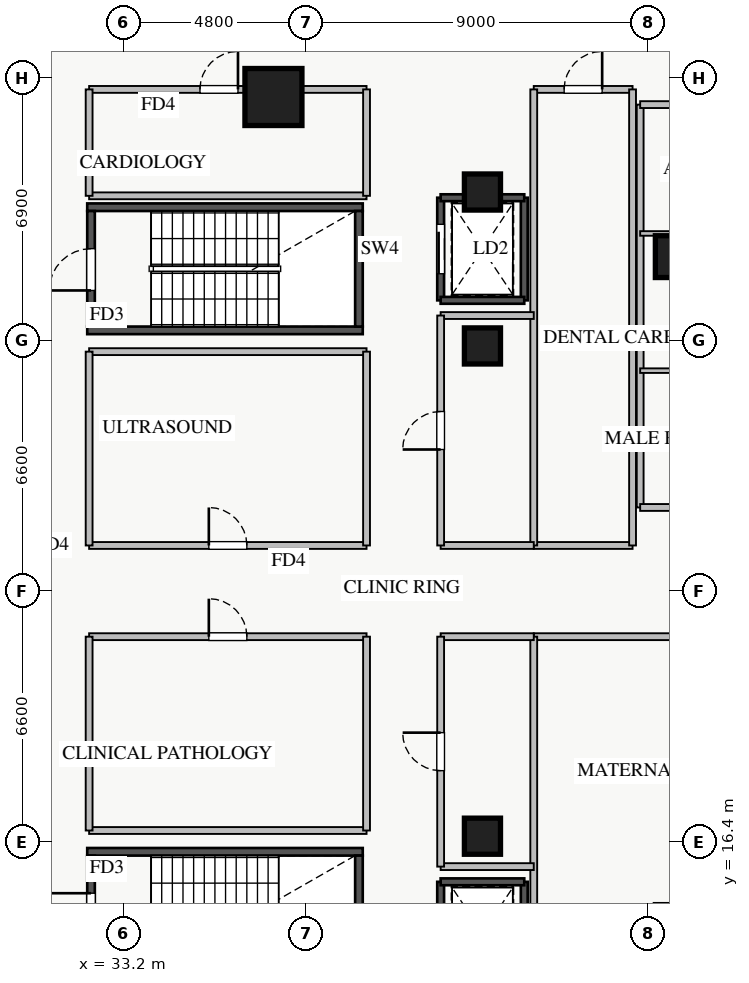
"""IFC4 building model, lengths in metres.
Left out: names, types, materials, properties, quantities, classifications, styles, units other than length and angle.
Written with IfcOpenShell. Run it as: python <this file> out.ifc"""

import sys

from ifc_helpers import new_model, si_unit, direction, frame, frame_2d, origin, origin_2d, place, context, subcontext, project, spatial, rectangle, extrude, source, transform, mapped, element, fill, save


model = new_model("IFC4")
c1 = context("Model", 3, precision=1e-05, world=origin(), true_north=direction((0.0, 1.0)))
c2 = subcontext(c1, "Body", "Model", "MODEL_VIEW")
j1 = project(units=[si_unit("LENGTHUNIT", "METRE"), si_unit("PLANEANGLEUNIT", "RADIAN")], contexts=[c1])
p1 = place(None, origin())
s1 = spatial("IfcSite", under=j1, at=p1, CompositionType="ELEMENT")
p2 = place(p1, origin())
s2 = spatial("IfcBuilding", under=s1, at=p2, CompositionType="ELEMENT")
p3 = place(p2, frame((0.0, 0.0, 5.0)))
s3 = spatial("IfcBuildingStorey", under=s2, at=p3, CompositionType="ELEMENT", Elevation=5.0)
p4 = place(p3, frame((41.55, 30.65, 0.0), z_axis=(0.0, 0.0, 1.0), x_axis=(0.0, 1.0, 0.0)))
e1 = element("IfcWall", 1, at=p4, inside=s3, PredefinedType="SHEAR", context=c2, shape_type="SweptSolid", body=[
    extrude(rectangle(XDim=2.7, YDim=0.18, at=frame_2d((1.35, 0.0))), origin(), (0.0, 0.0, 1.0), 4.18),
])
p5 = place(p4, frame((0.7, 0.0, 0.0)))
e2 = element("IfcOpeningElement", 2, at=p5, cuts=e1, PredefinedType="OPENING", context=c2, shape_type="SweptSolid", body=[
    extrude(rectangle(XDim=1.3, YDim=2.05, at=frame_2d((0.65, 1.025))), frame((0.0, 0.1, 0.0), z_axis=(0.0, -1.0, 0.0), x_axis=(1.0, 0.0, 0.0)), (0.0, 0.0, 1.0), 0.2),
])
p6 = place(p3, frame((43.75, 30.65, 0.0), z_axis=(0.0, 0.0, 1.0), x_axis=(0.0, 1.0, 0.0)))
e3 = element("IfcWall", 3, at=p6, inside=s3, PredefinedType="SHEAR", context=c2, shape_type="SweptSolid", body=[
    extrude(rectangle(XDim=2.7, YDim=0.18, at=frame_2d((1.35, 0.0))), origin(), (0.0, 0.0, 1.0), 4.18),
])
for number, where, z_axis, x_axis in (
    (4, (41.55, 30.65, 0.0), (0.0, 0.0, 1.0), (1.0, 0.0, 0.0)),
    (5, (41.55, 33.35, 0.0), (0.0, 0.0, 1.0), (1.0, 0.0, 0.0)),
):
    element("IfcWall", number, at=place(p3, frame(where, z_axis=z_axis, x_axis=x_axis)), inside=s3, PredefinedType="SHEAR", context=c2, shape_type="SweptSolid", body=[
        extrude(rectangle(XDim=2.2, YDim=0.18, at=frame_2d((1.1, 0.0))), origin(), (0.0, 0.0, 1.0), 4.18),
    ])
p7 = place(p3, frame((41.55, 12.65, 0.0), z_axis=(0.0, 0.0, 1.0), x_axis=(0.0, 1.0, 0.0)))
e6 = element("IfcWall", 6, at=p7, inside=s3, PredefinedType="SHEAR", context=c2, shape_type="SweptSolid", body=[
    extrude(rectangle(XDim=2.7, YDim=0.18, at=frame_2d((1.35, 0.0))), origin(), (0.0, 0.0, 1.0), 4.18),
])
p8 = place(p7, frame((0.7, 0.0, 0.0)))
e7 = element("IfcOpeningElement", 7, at=p8, cuts=e6, PredefinedType="OPENING", context=c2, shape_type="SweptSolid", body=[
    extrude(rectangle(XDim=1.3, YDim=2.05, at=frame_2d((0.65, 1.025))), frame((0.0, 0.1, 0.0), z_axis=(0.0, -1.0, 0.0), x_axis=(1.0, 0.0, 0.0)), (0.0, 0.0, 1.0), 0.2),
])
p9 = place(p3, frame((43.75, 12.65, 0.0), z_axis=(0.0, 0.0, 1.0), x_axis=(0.0, 1.0, 0.0)))
e8 = element("IfcWall", 8, at=p9, inside=s3, PredefinedType="SHEAR", context=c2, shape_type="SweptSolid", body=[
    extrude(rectangle(XDim=2.7, YDim=0.18, at=frame_2d((1.35, 0.0))), origin(), (0.0, 0.0, 1.0), 4.18),
])
p10 = place(p3, frame((41.55, 15.35, 0.0), z_axis=(0.0, 0.0, 1.0), x_axis=(1.0, 0.0, 0.0)))
e9 = element("IfcWall", 9, at=p10, inside=s3, PredefinedType="SHEAR", context=c2, shape_type="SweptSolid", body=[
    extrude(rectangle(XDim=2.2, YDim=0.18, at=frame_2d((1.1, 0.0))), origin(), (0.0, 0.0, 1.0), 4.18),
])
for number, where, z_axis, x_axis in (
    (10, (32.25, 29.86, 0.0), (0.0, 0.0, 1.0), (1.0, 0.0, 0.0)),
    (11, (32.25, 33.1, 0.0), (0.0, 0.0, 1.0), (1.0, 0.0, 0.0)),
):
    element("IfcWall", number, at=place(p3, frame(where, z_axis=z_axis, x_axis=x_axis)), inside=s3, PredefinedType="SHEAR", context=c2, shape_type="SweptSolid", body=[
        extrude(rectangle(XDim=7.25, YDim=0.2, at=frame_2d((3.625, 0.0))), origin(), (0.0, 0.0, 1.0), 4.4),
    ])
p11 = place(p3, frame((32.35, 29.96, 0.0), z_axis=(0.0, 0.0, 1.0), x_axis=(0.0, 1.0, 0.0)))
e12 = element("IfcWall", 12, at=p11, inside=s3, PredefinedType="SHEAR", context=c2, shape_type="SweptSolid", body=[
    extrude(rectangle(XDim=3.04, YDim=0.2, at=frame_2d((1.52, 0.0))), origin(), (0.0, 0.0, 1.0), 4.4),
])
p12 = place(p11, frame((0.95, 0.0, 0.0)))
e13 = element("IfcOpeningElement", 13, at=p12, cuts=e12, PredefinedType="OPENING", context=c2, shape_type="SweptSolid", body=[
    extrude(rectangle(XDim=1.1, YDim=2.05, at=frame_2d((0.55, 1.025))), frame((0.0, 0.11, 0.0), z_axis=(0.0, -1.0, 0.0), x_axis=(1.0, 0.0, 0.0)), (0.0, 0.0, 1.0), 0.22),
])
p13 = place(p3, frame((39.4, 29.96, 0.0), z_axis=(0.0, 0.0, 1.0), x_axis=(0.0, 1.0, 0.0)))
e14 = element("IfcWall", 14, at=p13, inside=s3, PredefinedType="SHEAR", context=c2, shape_type="SweptSolid", body=[
    extrude(rectangle(XDim=3.04, YDim=0.2, at=frame_2d((1.52, 0.0))), origin(), (0.0, 0.0, 1.0), 4.4),
])
p14 = place(p3, frame((32.25, 16.14, 0.0), z_axis=(0.0, 0.0, 1.0), x_axis=(1.0, 0.0, 0.0)))
e15 = element("IfcWall", 15, at=p14, inside=s3, PredefinedType="SHEAR", context=c2, shape_type="SweptSolid", body=[
    extrude(rectangle(XDim=7.25, YDim=0.2, at=frame_2d((3.625, 0.0))), origin(), (0.0, 0.0, 1.0), 4.4),
])
p15 = place(p3, frame((32.35, 13.0, 0.0), z_axis=(0.0, 0.0, 1.0), x_axis=(0.0, 1.0, 0.0)))
e16 = element("IfcWall", 16, at=p15, inside=s3, PredefinedType="SHEAR", context=c2, shape_type="SweptSolid", body=[
    extrude(rectangle(XDim=3.04, YDim=0.2, at=frame_2d((1.52, 0.0))), origin(), (0.0, 0.0, 1.0), 4.4),
])
p16 = place(p15, frame((0.95, 0.0, 0.0)))
e17 = element("IfcOpeningElement", 17, at=p16, cuts=e16, PredefinedType="OPENING", context=c2, shape_type="SweptSolid", body=[
    extrude(rectangle(XDim=1.1, YDim=2.05, at=frame_2d((0.55, 1.025))), frame((0.0, 0.11, 0.0), z_axis=(0.0, -1.0, 0.0), x_axis=(1.0, 0.0, 0.0)), (0.0, 0.0, 1.0), 0.22),
])
p17 = place(p3, frame((39.4, 13.0, 0.0), z_axis=(0.0, 0.0, 1.0), x_axis=(0.0, 1.0, 0.0)))
e18 = element("IfcWall", 18, at=p17, inside=s3, PredefinedType="SHEAR", context=c2, shape_type="SweptSolid", body=[
    extrude(rectangle(XDim=3.04, YDim=0.2, at=frame_2d((1.52, 0.0))), origin(), (0.0, 0.0, 1.0), 4.4),
])
m1 = source(origin(), c2, "Body", "SweptSolid", [
    extrude(rectangle(XDim=1.5, YDim=1.5, at=origin_2d()), origin(), (0.0, 0.0, 1.0), 4.4),
])
p18 = place(p3, frame((37.15, 36.0, 0.0), z_axis=(0.0, 0.0, 1.0), x_axis=(1.0, 0.0, 0.0)))
e19 = element("IfcColumn", 19, at=p18, inside=s3, PredefinedType="COLUMN", context=c2, shape_type="MappedRepresentation", body=[
    mapped(m1, transform((0.0, 0.0, 0.0), x_axis=(1.0, 0.0, 0.0), y_axis=(0.0, 1.0, 0.0), z_axis=(0.0, 0.0, 1.0), scale=1.0)),
])
m2 = source(origin(), c2, "Body", "SweptSolid", [
    extrude(rectangle(XDim=1.1, YDim=1.1, at=origin_2d()), origin(), (0.0, 0.0, 1.0), 4.4),
])
p19 = place(p3, frame((47.75, 31.8, 0.0), z_axis=(0.0, 0.0, 1.0), x_axis=(1.0, 0.0, 0.0)))
e20 = element("IfcColumn", 20, at=p19, inside=s3, PredefinedType="COLUMN", context=c2, shape_type="MappedRepresentation", body=[
    mapped(m2, transform((0.0, 0.0, 0.0), x_axis=(1.0, 0.0, 0.0), y_axis=(0.0, 1.0, 0.0), z_axis=(0.0, 0.0, 1.0), scale=1.0)),
])
m3 = source(origin(), c2, "Body", "SweptSolid", [
    extrude(rectangle(XDim=0.95, YDim=0.95, at=origin_2d()), origin(), (0.0, 0.0, 1.0), 4.4),
])
for number, where, z_axis, x_axis in (
    (21, (42.65, 16.55, 0.0), (0.0, 0.0, 1.0), (1.0, 0.0, 0.0)),
    (22, (42.65, 29.45, 0.0), (0.0, 0.0, 1.0), (1.0, 0.0, 0.0)),
    (23, (42.65, 33.5, 0.0), (0.0, 0.0, 1.0), (1.0, 0.0, 0.0)),
):
    element("IfcColumn", number, at=place(p3, frame(where, z_axis=z_axis, x_axis=x_axis)), inside=s3, PredefinedType="COLUMN", context=c2, shape_type="MappedRepresentation", body=[
        mapped(m3, transform((0.0, 0.0, 0.0), x_axis=(1.0, 0.0, 0.0), y_axis=(0.0, 1.0, 0.0), z_axis=(0.0, 0.0, 1.0), scale=1.0)),
    ])
p20 = place(p3, frame((46.8, 25.2, 0.0), z_axis=(0.0, 0.0, 1.0), x_axis=(0.0, 1.0, 0.0)))
e24 = element("IfcWall", 24, at=p20, inside=s3, PredefinedType="PARTITIONING", context=c2, shape_type="SweptSolid", body=[
    extrude(rectangle(XDim=10.6, YDim=0.18, at=frame_2d((5.3, 0.0))), origin(), (0.0, 0.0, 1.0), 4.18),
])
for number, where, z_axis, x_axis in (
    (25, (46.8, 25.2, 0.0), (0.0, 0.0, 1.0), (1.0, 0.0, 0.0)),
    (26, (46.8, 35.8, 0.0), (0.0, 0.0, 1.0), (1.0, 0.0, 0.0)),
):
    element("IfcWall", number, at=place(p3, frame(where, z_axis=z_axis, x_axis=x_axis)), inside=s3, PredefinedType="PARTITIONING", context=c2, shape_type="SweptSolid", body=[
        extrude(rectangle(XDim=5.2, YDim=0.18, at=frame_2d((2.6, 0.0))), origin(), (0.0, 0.0, 1.0), 4.18),
    ])
for number, where, z_axis, x_axis in (
    (27, (46.8, 28.8, 0.0), (0.0, 0.0, 1.0), (1.0, 0.0, 0.0)),
    (28, (46.8, 32.41, 0.0), (0.0, 0.0, 1.0), (1.0, 0.0, 0.0)),
):
    element("IfcWall", number, at=place(p3, frame(where, z_axis=z_axis, x_axis=x_axis)), inside=s3, PredefinedType="PLUMBINGWALL", context=c2, shape_type="SweptSolid", body=[
        extrude(rectangle(XDim=5.2, YDim=0.12, at=frame_2d((2.6, 0.0))), origin(), (0.0, 0.0, 1.0), 4.18),
    ])
p21 = place(p3, frame((32.3, 24.2, 0.0), z_axis=(0.0, 0.0, 1.0), x_axis=(1.0, 0.0, 0.0)))
e29 = element("IfcWall", 29, at=p21, inside=s3, PredefinedType="PARTITIONING", context=c2, shape_type="SweptSolid", body=[
    extrude(rectangle(XDim=7.3, YDim=0.18, at=frame_2d((3.65, 0.0))), origin(), (0.0, 0.0, 1.0), 4.18),
])
p22 = place(p21, frame((3.15, 0.0, 0.0)))
e30 = element("IfcOpeningElement", 30, at=p22, cuts=e29, PredefinedType="OPENING", context=c2, shape_type="SweptSolid", body=[
    extrude(rectangle(XDim=1.0, YDim=2.05, at=frame_2d((0.5, 1.025))), frame((0.0, 0.1, 0.0), z_axis=(0.0, -1.0, 0.0), x_axis=(1.0, 0.0, 0.0)), (0.0, 0.0, 1.0), 0.2),
])
p23 = place(p3, frame((32.3, 29.3, 0.0), z_axis=(0.0, 0.0, 1.0), x_axis=(1.0, 0.0, 0.0)))
e31 = element("IfcWall", 31, at=p23, inside=s3, PredefinedType="PARTITIONING", context=c2, shape_type="SweptSolid", body=[
    extrude(rectangle(XDim=7.3, YDim=0.18, at=frame_2d((3.65, 0.0))), origin(), (0.0, 0.0, 1.0), 3.475),
])
for number, where, z_axis, x_axis in (
    (32, (32.3, 24.2, 0.0), (0.0, 0.0, 1.0), (0.0, 1.0, 0.0)),
    (33, (39.6, 24.2, 0.0), (0.0, 0.0, 1.0), (0.0, 1.0, 0.0)),
):
    element("IfcWall", number, at=place(p3, frame(where, z_axis=z_axis, x_axis=x_axis)), inside=s3, PredefinedType="PARTITIONING", context=c2, shape_type="SweptSolid", body=[
        extrude(rectangle(XDim=5.1, YDim=0.18, at=frame_2d((2.55, 0.0))), origin(), (0.0, 0.0, 1.0), 4.18),
    ])
p24 = place(p3, frame((32.3, 33.4, 0.0), z_axis=(0.0, 0.0, 1.0), x_axis=(1.0, 0.0, 0.0)))
e34 = element("IfcWall", 34, at=p24, inside=s3, PredefinedType="PARTITIONING", context=c2, shape_type="SweptSolid", body=[
    extrude(rectangle(XDim=7.3, YDim=0.18, at=frame_2d((3.65, 0.0))), origin(), (0.0, 0.0, 1.0), 3.325),
])
p25 = place(p3, frame((32.3, 36.2, 0.0), z_axis=(0.0, 0.0, 1.0), x_axis=(1.0, 0.0, 0.0)))
e35 = element("IfcWall", 35, at=p25, inside=s3, PredefinedType="PARTITIONING", context=c2, shape_type="SweptSolid", body=[
    extrude(rectangle(XDim=7.3, YDim=0.18, at=frame_2d((3.65, 0.0))), origin(), (0.0, 0.0, 1.0), 4.18),
])
p26 = place(p25, frame((2.917, 0.0, 0.0)))
e36 = element("IfcOpeningElement", 36, at=p26, cuts=e35, PredefinedType="OPENING", context=c2, shape_type="SweptSolid", body=[
    extrude(rectangle(XDim=1.0, YDim=2.05, at=frame_2d((0.5, 1.025))), frame((0.0, 0.1, 0.0), z_axis=(0.0, -1.0, 0.0), x_axis=(1.0, 0.0, 0.0)), (0.0, 0.0, 1.0), 0.2),
])
for number, where, z_axis, x_axis in (
    (37, (32.3, 33.4, 0.0), (0.0, 0.0, 1.0), (0.0, 1.0, 0.0)),
    (38, (39.6, 33.4, 0.0), (0.0, 0.0, 1.0), (0.0, 1.0, 0.0)),
):
    element("IfcWall", number, at=place(p3, frame(where, z_axis=z_axis, x_axis=x_axis)), inside=s3, PredefinedType="PARTITIONING", context=c2, shape_type="SweptSolid", body=[
        extrude(rectangle(XDim=2.8, YDim=0.18, at=frame_2d((1.4, 0.0))), origin(), (0.0, 0.0, 1.0), 4.18),
    ])
p27 = place(p3, frame((32.3, 16.7, 0.0), z_axis=(0.0, 0.0, 1.0), x_axis=(1.0, 0.0, 0.0)))
e39 = element("IfcWall", 39, at=p27, inside=s3, PredefinedType="PARTITIONING", context=c2, shape_type="SweptSolid", body=[
    extrude(rectangle(XDim=7.3, YDim=0.18, at=frame_2d((3.65, 0.0))), origin(), (0.0, 0.0, 1.0), 3.475),
])
p28 = place(p3, frame((32.3, 21.8, 0.0), z_axis=(0.0, 0.0, 1.0), x_axis=(1.0, 0.0, 0.0)))
e40 = element("IfcWall", 40, at=p28, inside=s3, PredefinedType="PARTITIONING", context=c2, shape_type="SweptSolid", body=[
    extrude(rectangle(XDim=7.3, YDim=0.18, at=frame_2d((3.65, 0.0))), origin(), (0.0, 0.0, 1.0), 4.18),
])
p29 = place(p28, frame((3.15, 0.0, 0.0)))
e41 = element("IfcOpeningElement", 41, at=p29, cuts=e40, PredefinedType="OPENING", context=c2, shape_type="SweptSolid", body=[
    extrude(rectangle(XDim=1.0, YDim=2.05, at=frame_2d((0.5, 1.025))), frame((0.0, 0.1, 0.0), z_axis=(0.0, -1.0, 0.0), x_axis=(1.0, 0.0, 0.0)), (0.0, 0.0, 1.0), 0.2),
])
for number, where, z_axis, x_axis in (
    (42, (32.3, 16.7, 0.0), (0.0, 0.0, 1.0), (0.0, 1.0, 0.0)),
    (43, (39.6, 16.7, 0.0), (0.0, 0.0, 1.0), (0.0, 1.0, 0.0)),
):
    element("IfcWall", number, at=place(p3, frame(where, z_axis=z_axis, x_axis=x_axis)), inside=s3, PredefinedType="PARTITIONING", context=c2, shape_type="SweptSolid", body=[
        extrude(rectangle(XDim=5.1, YDim=0.18, at=frame_2d((2.55, 0.0))), origin(), (0.0, 0.0, 1.0), 4.18),
    ])
p30 = place(p3, frame((44.0, 21.8, 0.0), z_axis=(0.0, 0.0, 1.0), x_axis=(1.0, 0.0, 0.0)))
e44 = element("IfcWall", 44, at=p30, inside=s3, PredefinedType="PARTITIONING", context=c2, shape_type="SweptSolid", body=[
    extrude(rectangle(XDim=6.75, YDim=0.18, at=frame_2d((3.375, 0.0))), origin(), (0.0, 0.0, 1.0), 4.18),
])
p31 = place(p3, frame((44.0, 9.8, 0.0), z_axis=(0.0, 0.0, 1.0), x_axis=(0.0, 1.0, 0.0)))
e45 = element("IfcWall", 45, at=p31, inside=s3, PredefinedType="PARTITIONING", context=c2, shape_type="SweptSolid", body=[
    extrude(rectangle(XDim=12.0, YDim=0.18, at=frame_2d((6.0, 0.0))), origin(), (0.0, 0.0, 1.0), 4.18),
])
p32 = place(p3, frame((44.0, 24.2, 0.0), z_axis=(0.0, 0.0, 1.0), x_axis=(1.0, 0.0, 0.0)))
e46 = element("IfcWall", 46, at=p32, inside=s3, PredefinedType="PARTITIONING", context=c2, shape_type="SweptSolid", body=[
    extrude(rectangle(XDim=2.6, YDim=0.18, at=frame_2d((1.3, 0.0))), origin(), (0.0, 0.0, 1.0), 4.18),
])
p33 = place(p3, frame((44.0, 36.2, 0.0), z_axis=(0.0, 0.0, 1.0), x_axis=(1.0, 0.0, 0.0)))
e47 = element("IfcWall", 47, at=p33, inside=s3, PredefinedType="PARTITIONING", context=c2, shape_type="SweptSolid", body=[
    extrude(rectangle(XDim=2.6, YDim=0.18, at=frame_2d((1.3, 0.0))), origin(), (0.0, 0.0, 1.0), 4.18),
])
p34 = place(p33, frame((0.8, 0.0, 0.0)))
e48 = element("IfcOpeningElement", 48, at=p34, cuts=e47, PredefinedType="OPENING", context=c2, shape_type="SweptSolid", body=[
    extrude(rectangle(XDim=1.0, YDim=2.05, at=frame_2d((0.5, 1.025))), frame((0.0, 0.1, 0.0), z_axis=(0.0, -1.0, 0.0), x_axis=(1.0, 0.0, 0.0)), (0.0, 0.0, 1.0), 0.2),
])
for number, where, z_axis, x_axis in (
    (49, (44.0, 24.2, 0.0), (0.0, 0.0, 1.0), (0.0, 1.0, 0.0)),
    (50, (46.6, 24.2, 0.0), (0.0, 0.0, 1.0), (0.0, 1.0, 0.0)),
):
    element("IfcWall", number, at=place(p3, frame(where, z_axis=z_axis, x_axis=x_axis)), inside=s3, PredefinedType="PARTITIONING", context=c2, shape_type="SweptSolid", body=[
        extrude(rectangle(XDim=12.0, YDim=0.18, at=frame_2d((6.0, 0.0))), origin(), (0.0, 0.0, 1.0), 4.18),
    ])
for number, where, z_axis, x_axis in (
    (51, (41.55, 24.2, 0.0), (0.0, 0.0, 1.0), (1.0, 0.0, 0.0)),
    (52, (41.55, 30.25, 0.0), (0.0, 0.0, 1.0), (1.0, 0.0, 0.0)),
):
    element("IfcWall", number, at=place(p3, frame(where, z_axis=z_axis, x_axis=x_axis)), inside=s3, PredefinedType="PARTITIONING", context=c2, shape_type="SweptSolid", body=[
        extrude(rectangle(XDim=2.45, YDim=0.18, at=frame_2d((1.225, 0.0))), origin(), (0.0, 0.0, 1.0), 4.18),
    ])
p35 = place(p3, frame((41.55, 24.2, 0.0), z_axis=(0.0, 0.0, 1.0), x_axis=(0.0, 1.0, 0.0)))
e53 = element("IfcWall", 53, at=p35, inside=s3, PredefinedType="PARTITIONING", context=c2, shape_type="SweptSolid", body=[
    extrude(rectangle(XDim=6.05, YDim=0.18, at=frame_2d((3.025, 0.0))), origin(), (0.0, 0.0, 1.0), 4.18),
])
p36 = place(p35, frame((2.525, 0.0, 0.0)))
e54 = element("IfcOpeningElement", 54, at=p36, cuts=e53, PredefinedType="OPENING", context=c2, shape_type="SweptSolid", body=[
    extrude(rectangle(XDim=1.0, YDim=2.05, at=frame_2d((0.5, 1.025))), frame((0.0, 0.1, 0.0), z_axis=(0.0, -1.0, 0.0), x_axis=(1.0, 0.0, 0.0)), (0.0, 0.0, 1.0), 0.2),
])
for number, where, z_axis, x_axis in (
    (55, (41.55, 15.75, 0.0), (0.0, 0.0, 1.0), (1.0, 0.0, 0.0)),
    (56, (41.55, 21.8, 0.0), (0.0, 0.0, 1.0), (1.0, 0.0, 0.0)),
):
    element("IfcWall", number, at=place(p3, frame(where, z_axis=z_axis, x_axis=x_axis)), inside=s3, PredefinedType="PARTITIONING", context=c2, shape_type="SweptSolid", body=[
        extrude(rectangle(XDim=2.45, YDim=0.18, at=frame_2d((1.225, 0.0))), origin(), (0.0, 0.0, 1.0), 4.18),
    ])
p37 = place(p3, frame((41.55, 15.75, 0.0), z_axis=(0.0, 0.0, 1.0), x_axis=(0.0, 1.0, 0.0)))
e57 = element("IfcWall", 57, at=p37, inside=s3, PredefinedType="PARTITIONING", context=c2, shape_type="SweptSolid", body=[
    extrude(rectangle(XDim=6.05, YDim=0.18, at=frame_2d((3.025, 0.0))), origin(), (0.0, 0.0, 1.0), 4.18),
])
p38 = place(p37, frame((2.525, 0.0, 0.0)))
e58 = element("IfcOpeningElement", 58, at=p38, cuts=e57, PredefinedType="OPENING", context=c2, shape_type="SweptSolid", body=[
    extrude(rectangle(XDim=1.0, YDim=2.05, at=frame_2d((0.5, 1.025))), frame((0.0, 0.1, 0.0), z_axis=(0.0, -1.0, 0.0), x_axis=(1.0, 0.0, 0.0)), (0.0, 0.0, 1.0), 0.2),
])
m4 = source(origin(), c2, "Body", "SweptSolid", [
    extrude(rectangle(XDim=1.1, YDim=2.05, at=frame_2d((0.55, 1.025))), frame((0.0, 0.025, 0.0), z_axis=(0.0, -1.0, 0.0), x_axis=(1.0, 0.0, 0.0)), (0.0, 0.0, 1.0), 0.05),
])
p39 = place(p12, origin())
e59 = element("IfcDoor", 59, at=p39, inside=s3, OperationType="SINGLE_SWING_LEFT", PredefinedType="DOOR", context=c2, shape_type="MappedRepresentation", body=[
    mapped(m4, transform((0.0, 0.0, 0.0), x_axis=(1.0, 0.0, 0.0), y_axis=(0.0, 1.0, 0.0), z_axis=(0.0, 0.0, 1.0), scale=1.0)),
])
fill(e13, e59)
p40 = place(p16, origin())
e60 = element("IfcDoor", 60, at=p40, inside=s3, OperationType="SINGLE_SWING_RIGHT", PredefinedType="DOOR", context=c2, shape_type="MappedRepresentation", body=[
    mapped(m4, transform((0.0, 0.0, 0.0), x_axis=(1.0, 0.0, 0.0), y_axis=(0.0, 1.0, 0.0), z_axis=(0.0, 0.0, 1.0), scale=1.0)),
])
fill(e17, e60)
m5 = source(origin(), c2, "Body", "SweptSolid", [
    extrude(rectangle(XDim=1.3, YDim=2.05, at=frame_2d((0.65, 1.025))), frame((0.0, 0.025, 0.0), z_axis=(0.0, -1.0, 0.0), x_axis=(1.0, 0.0, 0.0)), (0.0, 0.0, 1.0), 0.05),
])
p41 = place(p5, origin())
e61 = element("IfcDoor", 61, at=p41, inside=s3, OperationType="SLIDING_TO_LEFT", PredefinedType="DOOR", context=c2, shape_type="MappedRepresentation", body=[
    mapped(m5, transform((0.0, 0.0, 0.0), x_axis=(1.0, 0.0, 0.0), y_axis=(0.0, 1.0, 0.0), z_axis=(0.0, 0.0, 1.0), scale=1.0)),
])
fill(e2, e61)
m6 = source(origin(), c2, "Body", "SweptSolid", [
    extrude(rectangle(XDim=1.0, YDim=2.05, at=frame_2d((0.5, 1.025))), frame((0.0, 0.025, 0.0), z_axis=(0.0, -1.0, 0.0), x_axis=(1.0, 0.0, 0.0)), (0.0, 0.0, 1.0), 0.05),
])
p42 = place(p22, origin())
e62 = element("IfcDoor", 62, at=p42, inside=s3, OperationType="SINGLE_SWING_LEFT", PredefinedType="DOOR", context=c2, shape_type="MappedRepresentation", body=[
    mapped(m6, transform((0.0, 0.0, 0.0), x_axis=(1.0, 0.0, 0.0), y_axis=(0.0, 1.0, 0.0), z_axis=(0.0, 0.0, 1.0), scale=1.0)),
])
fill(e30, e62)
p43 = place(p26, origin())
e63 = element("IfcDoor", 63, at=p43, inside=s3, OperationType="SINGLE_SWING_RIGHT", PredefinedType="DOOR", context=c2, shape_type="MappedRepresentation", body=[
    mapped(m6, transform((0.0, 0.0, 0.0), x_axis=(1.0, 0.0, 0.0), y_axis=(0.0, 1.0, 0.0), z_axis=(0.0, 0.0, 1.0), scale=1.0)),
])
fill(e36, e63)
p44 = place(p29, origin())
e64 = element("IfcDoor", 64, at=p44, inside=s3, OperationType="SINGLE_SWING_LEFT", PredefinedType="DOOR", context=c2, shape_type="MappedRepresentation", body=[
    mapped(m6, transform((0.0, 0.0, 0.0), x_axis=(1.0, 0.0, 0.0), y_axis=(0.0, 1.0, 0.0), z_axis=(0.0, 0.0, 1.0), scale=1.0)),
])
fill(e41, e64)
p45 = place(p34, origin())
e65 = element("IfcDoor", 65, at=p45, inside=s3, OperationType="SINGLE_SWING_RIGHT", PredefinedType="DOOR", context=c2, shape_type="MappedRepresentation", body=[
    mapped(m6, transform((0.0, 0.0, 0.0), x_axis=(1.0, 0.0, 0.0), y_axis=(0.0, 1.0, 0.0), z_axis=(0.0, 0.0, 1.0), scale=1.0)),
])
fill(e48, e65)
p46 = place(p36, origin())
e66 = element("IfcDoor", 66, at=p46, inside=s3, OperationType="SINGLE_SWING_LEFT", PredefinedType="DOOR", context=c2, shape_type="MappedRepresentation", body=[
    mapped(m6, transform((0.0, 0.0, 0.0), x_axis=(1.0, 0.0, 0.0), y_axis=(0.0, 1.0, 0.0), z_axis=(0.0, 0.0, 1.0), scale=1.0)),
])
fill(e54, e66)
p47 = place(p38, origin())
e67 = element("IfcDoor", 67, at=p47, inside=s3, OperationType="SINGLE_SWING_RIGHT", PredefinedType="DOOR", context=c2, shape_type="MappedRepresentation", body=[
    mapped(m6, transform((0.0, 0.0, 0.0), x_axis=(1.0, 0.0, 0.0), y_axis=(0.0, 1.0, 0.0), z_axis=(0.0, 0.0, 1.0), scale=1.0)),
])
fill(e58, e67)
save(model, sys.argv[1])
